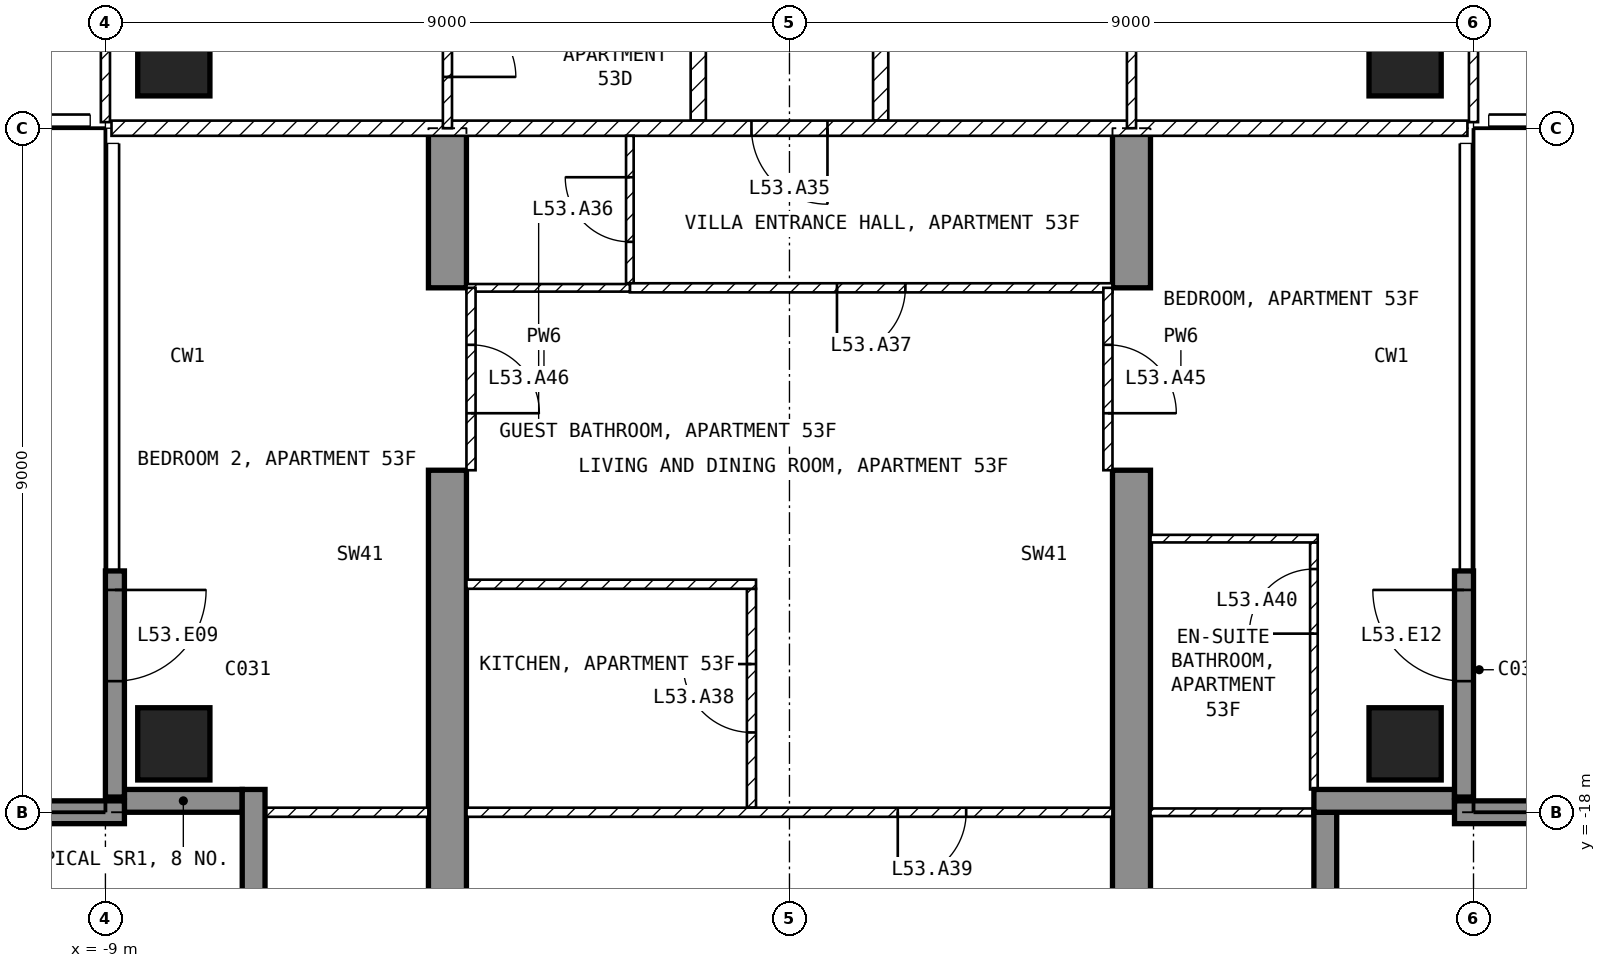
"""IFC4 building model, lengths in metres.
Left out: names, types, materials, properties, quantities, classifications, styles, units other than length and angle.
Written with IfcOpenShell. Run it as: python <this file> out.ifc"""

import sys

from ifc_helpers import new_model, si_unit, direction, frame, frame_2d, origin, origin_2d, place, context, subcontext, project, spatial, polyline, rectangle, outline, extrude, element, fill, save


model = new_model("IFC4")
c1 = context("Model", 3, precision=1e-05, world=origin(), true_north=direction((0.0, 1.0)))
c2 = subcontext(c1, "Body", "Model", "MODEL_VIEW")
j1 = project(units=[si_unit("LENGTHUNIT", "METRE"), si_unit("PLANEANGLEUNIT", "RADIAN")], contexts=[c1])
p1 = place(None, origin())
s1 = spatial("IfcSite", under=j1, at=p1, CompositionType="ELEMENT")
p2 = place(p1, origin())
s2 = spatial("IfcBuilding", under=s1, at=p2, CompositionType="ELEMENT")
p3 = place(p2, frame((0.0, 0.0, 212.1)))
s3 = spatial("IfcBuildingStorey", under=s2, at=p3, CompositionType="ELEMENT", Elevation=212.1)
for number, where, z_axis, x_axis in (
    (1, (-8.1, -17.1, -0.25), (0.0, 0.0, 1.0), (1.0, 0.0, 0.0)),
    (2, (-8.1, -8.1, -0.25), (0.0, 0.0, 1.0), (1.0, 0.0, 0.0)),
    (3, (8.1, -17.1, -0.25), (0.0, 0.0, 1.0), (1.0, 0.0, 0.0)),
    (4, (8.1, -8.1, -0.25), (0.0, 0.0, 1.0), (1.0, 0.0, 0.0)),
):
    element("IfcColumn", number, at=place(p3, frame(where, z_axis=z_axis, x_axis=x_axis)), inside=s3, PredefinedType="COLUMN", context=c2, shape_type="SweptSolid", body=[
        extrude(rectangle(XDim=0.95, YDim=0.95, at=origin_2d()), origin(), (0.0, 0.0, 1.0), 3.5),
    ])
for number, where, z_axis, x_axis in (
    (5, (-4.75, -20.225, -0.25), (1.0, 0.0, 0.0), (0.0, 1.0, 0.0)),
    (6, (4.25, -20.225, -0.25), (1.0, 0.0, 0.0), (0.0, 1.0, 0.0)),
):
    element("IfcWall", number, at=place(p3, frame(where, z_axis=z_axis, x_axis=x_axis)), inside=s3, PredefinedType="SHEAR", context=c2, shape_type="SweptSolid", body=[
        extrude(outline(polyline([(0.0, 0.0), (6.725, 0.0), (6.725, 2.65), (9.125, 2.65), (9.125, 0.0), (11.225, 0.0), (11.225, 3.5), (0.0, 3.5), (0.0, 0.0)])), origin(), (0.0, 0.0, 1.0), 0.5),
    ])
p4 = place(p3, frame((-8.875, -14.825, 0.0), z_axis=(0.0, 0.0, 1.0), x_axis=(0.0, -1.0, 0.0)))
e7 = element("IfcWall", 7, at=p4, inside=s3, PredefinedType="SOLIDWALL", context=c2, shape_type="SweptSolid", body=[
    extrude(rectangle(XDim=2.975, YDim=0.25, at=frame_2d((1.488, 0.0))), origin(), (0.0, 0.0, 1.0), 3.25),
])
p5 = place(p4, frame((0.25, 0.0, 0.0)))
e8 = element("IfcOpeningElement", 8, at=p5, cuts=e7, PredefinedType="OPENING", context=c2, shape_type="SweptSolid", body=[
    extrude(rectangle(XDim=1.2, YDim=2.4, at=frame_2d((0.6, 1.2))), frame((0.0, 0.135, 0.0), z_axis=(0.0, -1.0, 0.0), x_axis=(1.0, 0.0, 0.0)), (0.0, 0.0, 1.0), 0.27),
])
p6 = place(p3, frame((8.875, -17.8, 0.0), z_axis=(0.0, 0.0, 1.0), x_axis=(0.0, 1.0, 0.0)))
e9 = element("IfcWall", 9, at=p6, inside=s3, PredefinedType="SOLIDWALL", context=c2, shape_type="SweptSolid", body=[
    extrude(rectangle(XDim=2.975, YDim=0.25, at=frame_2d((1.488, 0.0))), origin(), (0.0, 0.0, 1.0), 3.25),
])
p7 = place(p6, frame((1.525, 0.0, 0.0)))
e10 = element("IfcOpeningElement", 10, at=p7, cuts=e9, PredefinedType="OPENING", context=c2, shape_type="SweptSolid", body=[
    extrude(rectangle(XDim=1.2, YDim=2.4, at=frame_2d((0.6, 1.2))), frame((0.0, 0.135, 0.0), z_axis=(0.0, -1.0, 0.0), x_axis=(1.0, 0.0, 0.0)), (0.0, 0.0, 1.0), 0.27),
])
p8 = place(p3, frame((7.05, -19.8, 0.0), z_axis=(0.0, 0.0, 1.0), x_axis=(0.0, 1.0, 0.0)))
e11 = element("IfcWall", 11, at=p8, inside=s3, PredefinedType="SOLIDWALL", context=c2, shape_type="SweptSolid", body=[
    extrude(rectangle(XDim=1.8, YDim=0.3, at=frame_2d((0.9, 0.0))), origin(), (0.0, 0.0, 1.0), 3.25),
])
p9 = place(p3, frame((6.9, -17.85, 0.0), z_axis=(0.0, 0.0, 1.0), x_axis=(1.0, 0.0, 0.0)))
e12 = element("IfcWall", 12, at=p9, inside=s3, PredefinedType="SOLIDWALL", context=c2, shape_type="SweptSolid", body=[
    extrude(rectangle(XDim=1.85, YDim=0.3, at=frame_2d((0.925, 0.0))), origin(), (0.0, 0.0, 1.0), 3.25),
])
p10 = place(p3, frame((-8.75, -17.85, 0.0), z_axis=(0.0, 0.0, 1.0), x_axis=(1.0, 0.0, 0.0)))
e13 = element("IfcWall", 13, at=p10, inside=s3, PredefinedType="SOLIDWALL", context=c2, shape_type="SweptSolid", body=[
    extrude(rectangle(XDim=1.55, YDim=0.3, at=frame_2d((0.775, 0.0))), origin(), (0.0, 0.0, 1.0), 3.25),
])
p11 = place(p3, frame((-7.05, -17.7, 0.0), z_axis=(0.0, 0.0, 1.0), x_axis=(0.0, -1.0, 0.0)))
e14 = element("IfcWall", 14, at=p11, inside=s3, PredefinedType="SOLIDWALL", context=c2, shape_type="SweptSolid", body=[
    extrude(rectangle(XDim=1.8, YDim=0.3, at=frame_2d((0.9, 0.0))), origin(), (0.0, 0.0, 1.0), 3.25),
])
for number, where, z_axis, x_axis in (
    (15, (-8.75, -18.0, 0.0), (0.0, 0.0, 1.0), (-1.0, 0.0, 0.0)),
    (16, (8.75, -18.0, 0.0), (0.0, 0.0, 1.0), (1.0, 0.0, 0.0)),
):
    element("IfcWall", number, at=place(p3, frame(where, z_axis=z_axis, x_axis=x_axis)), inside=s3, PredefinedType="SOLIDWALL", context=c2, shape_type="SweptSolid", body=[
        extrude(rectangle(XDim=2.95, YDim=0.3, at=frame_2d((1.475, 0.0))), origin(), (0.0, 0.0, 1.0), 3.25),
    ])
for number, where, z_axis, x_axis in (
    (17, (1.2, -4.6, 0.0), (0.0, 0.0, 1.0), (0.0, -1.0, 0.0)),
    (18, (-1.2, -8.9, 0.0), (0.0, 0.0, 1.0), (0.0, 1.0, 0.0)),
):
    element("IfcWall", number, at=place(p3, frame(where, z_axis=z_axis, x_axis=x_axis)), inside=s3, PredefinedType="PARTITIONING", context=c2, shape_type="SweptSolid", body=[
        extrude(rectangle(XDim=4.3, YDim=0.2, at=frame_2d((2.15, 0.0))), origin(), (0.0, 0.0, 1.0), 3.25),
    ])
p12 = place(p3, frame((8.92, -9.0, 0.0), z_axis=(0.0, 0.0, 1.0), x_axis=(-1.0, 0.0, 0.0)))
e19 = element("IfcWall", 19, at=p12, inside=s3, PredefinedType="PARTITIONING", context=c2, shape_type="SweptSolid", body=[
    extrude(rectangle(XDim=17.84, YDim=0.2, at=frame_2d((8.92, 0.0))), origin(), (0.0, 0.0, 1.0), 3.25),
])
p13 = place(p12, frame((8.42, 0.0, 0.0)))
e20 = element("IfcOpeningElement", 20, at=p13, cuts=e19, PredefinedType="OPENING", context=c2, shape_type="SweptSolid", body=[
    extrude(rectangle(XDim=1.0, YDim=2.1, at=frame_2d((0.5, 1.05))), frame((0.0, 0.11, 0.0), z_axis=(0.0, -1.0, 0.0), x_axis=(1.0, 0.0, 0.0)), (0.0, 0.0, 1.0), 0.22),
])
p14 = place(p3, frame((9.0, -8.92, 0.0), z_axis=(0.0, 0.0, 1.0), x_axis=(0.0, 1.0, 0.0)))
e21 = element("IfcWall", 21, at=p14, inside=s3, PredefinedType="PARTITIONING", context=c2, shape_type="SweptSolid", body=[
    extrude(rectangle(XDim=7.62, YDim=0.12, at=frame_2d((3.81, 0.0))), origin(), (0.0, 0.0, 1.0), 3.25),
])
p15 = place(p14, frame((2.42, 0.0, 0.0)))
e22 = element("IfcOpeningElement", 22, at=p15, cuts=e21, PredefinedType="OPENING", context=c2, shape_type="SweptSolid", body=[
    extrude(rectangle(XDim=0.9, YDim=2.1, at=frame_2d((0.45, 1.05))), frame((0.0, 0.07, 0.0), z_axis=(0.0, -1.0, 0.0), x_axis=(1.0, 0.0, 0.0)), (0.0, 0.0, 1.0), 0.14),
])
p16 = place(p3, frame((4.5, -9.0, 0.0), z_axis=(0.0, 0.0, 1.0), x_axis=(0.0, 1.0, 0.0)))
e23 = element("IfcWall", 23, at=p16, inside=s3, PredefinedType="PARTITIONING", context=c2, shape_type="SweptSolid", body=[
    extrude(rectangle(XDim=4.4, YDim=0.12, at=frame_2d((2.2, 0.0))), origin(), (0.0, 0.0, 1.0), 3.25),
])
p17 = place(p16, frame((1.75, 0.0, 0.0)))
e24 = element("IfcOpeningElement", 24, at=p17, cuts=e23, PredefinedType="OPENING", context=c2, shape_type="SweptSolid", body=[
    extrude(rectangle(XDim=0.9, YDim=2.1, at=frame_2d((0.45, 1.05))), frame((0.0, 0.07, 0.0), z_axis=(0.0, -1.0, 0.0), x_axis=(1.0, 0.0, 0.0)), (0.0, 0.0, 1.0), 0.14),
])
p18 = place(p3, frame((-9.0, -1.3, 0.0), z_axis=(0.0, 0.0, 1.0), x_axis=(0.0, -1.0, 0.0)))
e25 = element("IfcWall", 25, at=p18, inside=s3, PredefinedType="PARTITIONING", context=c2, shape_type="SweptSolid", body=[
    extrude(rectangle(XDim=7.62, YDim=0.12, at=frame_2d((3.81, 0.0))), origin(), (0.0, 0.0, 1.0), 3.25),
])
p19 = place(p18, frame((4.3, 0.0, 0.0)))
e26 = element("IfcOpeningElement", 26, at=p19, cuts=e25, PredefinedType="OPENING", context=c2, shape_type="SweptSolid", body=[
    extrude(rectangle(XDim=0.9, YDim=2.1, at=frame_2d((0.45, 1.05))), frame((0.0, 0.07, 0.0), z_axis=(0.0, -1.0, 0.0), x_axis=(1.0, 0.0, 0.0)), (0.0, 0.0, 1.0), 0.14),
])
p20 = place(p3, frame((-4.5, -6.75, 0.0), z_axis=(0.0, 0.0, 1.0), x_axis=(0.0, -1.0, 0.0)))
e27 = element("IfcWall", 27, at=p20, inside=s3, PredefinedType="PARTITIONING", context=c2, shape_type="SweptSolid", body=[
    extrude(rectangle(XDim=2.25, YDim=0.12, at=frame_2d((1.125, 0.0))), origin(), (0.0, 0.0, 1.0), 3.25),
])
p21 = place(p20, frame((0.675, 0.0, 0.0)))
e28 = element("IfcOpeningElement", 28, at=p21, cuts=e27, PredefinedType="OPENING", context=c2, shape_type="SweptSolid", body=[
    extrude(rectangle(XDim=0.9, YDim=2.1, at=frame_2d((0.45, 1.05))), frame((0.0, 0.07, 0.0), z_axis=(0.0, -1.0, 0.0), x_axis=(1.0, 0.0, 0.0)), (0.0, 0.0, 1.0), 0.14),
])
p22 = place(p3, frame((-2.1, -11.04, 0.0), z_axis=(0.0, 0.0, 1.0), x_axis=(0.0, 1.0, 0.0)))
e29 = element("IfcWall", 29, at=p22, inside=s3, PredefinedType="PARTITIONING", context=c2, shape_type="SweptSolid", body=[
    extrude(rectangle(XDim=1.94, YDim=0.1, at=frame_2d((0.97, 0.0))), origin(), (0.0, 0.0, 1.0), 3.25),
])
p23 = place(p22, frame((0.545, 0.0, 0.0)))
e30 = element("IfcOpeningElement", 30, at=p23, cuts=e29, PredefinedType="OPENING", context=c2, shape_type="SweptSolid", body=[
    extrude(rectangle(XDim=0.85, YDim=2.1, at=frame_2d((0.425, 1.05))), frame((0.0, 0.06, 0.0), z_axis=(0.0, -1.0, 0.0), x_axis=(1.0, 0.0, 0.0)), (0.0, 0.0, 1.0), 0.12),
])
p24 = place(p3, frame((4.25, -11.1, 0.0), z_axis=(0.0, 0.0, 1.0), x_axis=(-1.0, 0.0, 0.0)))
e31 = element("IfcWall", 31, at=p24, inside=s3, PredefinedType="PARTITIONING", context=c2, shape_type="SweptSolid", body=[
    extrude(rectangle(XDim=6.35, YDim=0.12, at=frame_2d((3.175, 0.0))), origin(), (0.0, 0.0, 1.0), 3.25),
])
p25 = place(p24, frame((2.725, 0.0, 0.0)))
e32 = element("IfcOpeningElement", 32, at=p25, cuts=e31, PredefinedType="OPENING", context=c2, shape_type="SweptSolid", body=[
    extrude(rectangle(XDim=0.9, YDim=2.1, at=frame_2d((0.45, 1.05))), frame((0.0, 0.07, 0.0), z_axis=(0.0, -1.0, 0.0), x_axis=(1.0, 0.0, 0.0)), (0.0, 0.0, 1.0), 0.14),
])
p26 = place(p3, frame((-2.1, -11.1, 0.0), z_axis=(0.0, 0.0, 1.0), x_axis=(-1.0, 0.0, 0.0)))
e33 = element("IfcWall", 33, at=p26, inside=s3, PredefinedType="PARTITIONING", context=c2, shape_type="SweptSolid", body=[
    extrude(rectangle(XDim=2.15, YDim=0.1, at=frame_2d((1.075, 0.0))), origin(), (0.0, 0.0, 1.0), 3.25),
])
p27 = place(p3, frame((-0.5, -17.94, 0.0), z_axis=(0.0, 0.0, 1.0), x_axis=(0.0, 1.0, 0.0)))
e34 = element("IfcWall", 34, at=p27, inside=s3, PredefinedType="PARTITIONING", context=c2, shape_type="SweptSolid", body=[
    extrude(rectangle(XDim=2.88, YDim=0.12, at=frame_2d((1.44, 0.0))), origin(), (0.0, 0.0, 1.0), 3.25),
])
p28 = place(p27, frame((0.99, 0.0, 0.0)))
e35 = element("IfcOpeningElement", 35, at=p28, cuts=e34, PredefinedType="OPENING", context=c2, shape_type="SweptSolid", body=[
    extrude(rectangle(XDim=0.9, YDim=2.1, at=frame_2d((0.45, 1.05))), frame((0.0, 0.07, 0.0), z_axis=(0.0, -1.0, 0.0), x_axis=(1.0, 0.0, 0.0)), (0.0, 0.0, 1.0), 0.14),
])
p29 = place(p3, frame((-0.44, -15.0, 0.0), z_axis=(0.0, 0.0, 1.0), x_axis=(-1.0, 0.0, 0.0)))
e36 = element("IfcWall", 36, at=p29, inside=s3, PredefinedType="PARTITIONING", context=c2, shape_type="SweptSolid", body=[
    extrude(rectangle(XDim=3.81, YDim=0.12, at=frame_2d((1.905, 0.0))), origin(), (0.0, 0.0, 1.0), 3.25),
])
p30 = place(p3, frame((4.25, -18.0, 0.0), z_axis=(0.0, 0.0, 1.0), x_axis=(-1.0, 0.0, 0.0)))
e37 = element("IfcWall", 37, at=p30, inside=s3, PredefinedType="PARTITIONING", context=c2, shape_type="SweptSolid", body=[
    extrude(rectangle(XDim=8.5, YDim=0.12, at=frame_2d((4.25, 0.0))), origin(), (0.0, 0.0, 1.0), 3.25),
])
p31 = place(p30, frame((1.925, 0.0, 0.0)))
e38 = element("IfcOpeningElement", 38, at=p31, cuts=e37, PredefinedType="OPENING", context=c2, shape_type="SweptSolid", body=[
    extrude(rectangle(XDim=0.9, YDim=2.1, at=frame_2d((0.45, 1.05))), frame((0.0, 0.07, 0.0), z_axis=(0.0, -1.0, 0.0), x_axis=(1.0, 0.0, 0.0)), (0.0, 0.0, 1.0), 0.14),
])
p32 = place(p3, frame((6.9, -17.7, 0.0), z_axis=(0.0, 0.0, 1.0), x_axis=(0.0, 1.0, 0.0)))
e39 = element("IfcWall", 39, at=p32, inside=s3, PredefinedType="PARTITIONING", context=c2, shape_type="SweptSolid", body=[
    extrude(rectangle(XDim=3.25, YDim=0.1, at=frame_2d((1.625, 0.0))), origin(), (0.0, 0.0, 1.0), 3.25),
])
p33 = place(p32, frame((2.05, 0.0, 0.0)))
e40 = element("IfcOpeningElement", 40, at=p33, cuts=e39, PredefinedType="OPENING", context=c2, shape_type="SweptSolid", body=[
    extrude(rectangle(XDim=0.85, YDim=2.1, at=frame_2d((0.425, 1.05))), frame((0.0, 0.06, 0.0), z_axis=(0.0, -1.0, 0.0), x_axis=(1.0, 0.0, 0.0)), (0.0, 0.0, 1.0), 0.12),
])
p34 = place(p3, frame((6.95, -14.4, 0.0), z_axis=(0.0, 0.0, 1.0), x_axis=(-1.0, 0.0, 0.0)))
e41 = element("IfcWall", 41, at=p34, inside=s3, PredefinedType="PARTITIONING", context=c2, shape_type="SweptSolid", body=[
    extrude(rectangle(XDim=2.2, YDim=0.1, at=frame_2d((1.1, 0.0))), origin(), (0.0, 0.0, 1.0), 3.25),
])
p35 = place(p3, frame((7.12, -18.0, 0.0), z_axis=(0.0, 0.0, 1.0), x_axis=(-1.0, 0.0, 0.0)))
e42 = element("IfcWall", 42, at=p35, inside=s3, PredefinedType="PARTITIONING", context=c2, shape_type="SweptSolid", body=[
    extrude(rectangle(XDim=2.37, YDim=0.1, at=frame_2d((1.185, 0.0))), origin(), (0.0, 0.0, 1.0), 3.25),
])
p36 = place(p3, frame((-4.75, -18.0, 0.0), z_axis=(0.0, 0.0, 1.0), x_axis=(-1.0, 0.0, 0.0)))
e43 = element("IfcWall", 43, at=p36, inside=s3, PredefinedType="PARTITIONING", context=c2, shape_type="SweptSolid", body=[
    extrude(rectangle(XDim=2.37, YDim=0.12, at=frame_2d((1.185, 0.0))), origin(), (0.0, 0.0, 1.0), 3.25),
])
p37 = place(p3, frame((4.19, -11.1, 0.0), z_axis=(0.0, 0.0, 1.0), x_axis=(0.0, -1.0, 0.0)))
e44 = element("IfcWall", 44, at=p37, inside=s3, PredefinedType="PARTITIONING", context=c2, shape_type="SweptSolid", body=[
    extrude(rectangle(XDim=2.4, YDim=0.12, at=frame_2d((1.2, 0.0))), origin(), (0.0, 0.0, 1.0), 2.4),
])
p38 = place(p37, frame((0.75, 0.0, 0.0)))
e45 = element("IfcOpeningElement", 45, at=p38, cuts=e44, PredefinedType="OPENING", context=c2, shape_type="SweptSolid", body=[
    extrude(rectangle(XDim=0.9, YDim=2.1, at=frame_2d((0.45, 1.05))), frame((0.0, 0.07, 0.0), z_axis=(0.0, -1.0, 0.0), x_axis=(1.0, 0.0, 0.0)), (0.0, 0.0, 1.0), 0.14),
])
p39 = place(p3, frame((-4.19, -11.1, 0.0), z_axis=(0.0, 0.0, 1.0), x_axis=(0.0, -1.0, 0.0)))
e46 = element("IfcWall", 46, at=p39, inside=s3, PredefinedType="PARTITIONING", context=c2, shape_type="SweptSolid", body=[
    extrude(rectangle(XDim=2.4, YDim=0.12, at=frame_2d((1.2, 0.0))), origin(), (0.0, 0.0, 1.0), 2.4),
])
p40 = place(p39, frame((0.75, 0.0, 0.0)))
e47 = element("IfcOpeningElement", 47, at=p40, cuts=e46, PredefinedType="OPENING", context=c2, shape_type="SweptSolid", body=[
    extrude(rectangle(XDim=0.9, YDim=2.1, at=frame_2d((0.45, 1.05))), frame((0.0, 0.07, 0.0), z_axis=(0.0, -1.0, 0.0), x_axis=(1.0, 0.0, 0.0)), (0.0, 0.0, 1.0), 0.14),
])
p41 = place(p5, origin())
e48 = element("IfcDoor", 48, at=p41, inside=s3, OperationType="SINGLE_SWING_LEFT", PredefinedType="DOOR", context=c2, shape_type="SweptSolid", body=[
    extrude(rectangle(XDim=1.2, YDim=2.4, at=frame_2d((0.6, 1.2))), frame((0.0, 0.025, 0.0), z_axis=(0.0, -1.0, 0.0), x_axis=(1.0, 0.0, 0.0)), (0.0, 0.0, 1.0), 0.05),
])
fill(e8, e48)
p42 = place(p7, origin())
e49 = element("IfcDoor", 49, at=p42, inside=s3, OperationType="SINGLE_SWING_RIGHT", PredefinedType="DOOR", context=c2, shape_type="SweptSolid", body=[
    extrude(rectangle(XDim=1.2, YDim=2.4, at=frame_2d((0.6, 1.2))), frame((0.0, 0.025, 0.0), z_axis=(0.0, -1.0, 0.0), x_axis=(1.0, 0.0, 0.0)), (0.0, 0.0, 1.0), 0.05),
])
fill(e10, e49)
p43 = place(p21, origin())
e50 = element("IfcDoor", 50, at=p43, inside=s3, OperationType="SINGLE_SWING_RIGHT", PredefinedType="DOOR", context=c2, shape_type="SweptSolid", body=[
    extrude(rectangle(XDim=0.9, YDim=2.1, at=frame_2d((0.45, 1.05))), frame((0.0, 0.025, 0.0), z_axis=(0.0, -1.0, 0.0), x_axis=(1.0, 0.0, 0.0)), (0.0, 0.0, 1.0), 0.05),
])
fill(e28, e50)
p44 = place(p13, origin())
e51 = element("IfcDoor", 51, at=p44, inside=s3, OperationType="SINGLE_SWING_LEFT", PredefinedType="DOOR", context=c2, shape_type="SweptSolid", body=[
    extrude(rectangle(XDim=1.0, YDim=2.1, at=frame_2d((0.5, 1.05))), frame((0.0, 0.025, 0.0), z_axis=(0.0, -1.0, 0.0), x_axis=(1.0, 0.0, 0.0)), (0.0, 0.0, 1.0), 0.05),
])
fill(e20, e51)
p45 = place(p23, origin())
e52 = element("IfcDoor", 52, at=p45, inside=s3, OperationType="SINGLE_SWING_RIGHT", PredefinedType="DOOR", context=c2, shape_type="SweptSolid", body=[
    extrude(rectangle(XDim=0.85, YDim=2.1, at=frame_2d((0.425, 1.05))), frame((0.0, 0.025, 0.0), z_axis=(0.0, -1.0, 0.0), x_axis=(1.0, 0.0, 0.0)), (0.0, 0.0, 1.0), 0.05),
])
fill(e30, e52)
p46 = place(p25, origin())
e53 = element("IfcDoor", 53, at=p46, inside=s3, OperationType="SINGLE_SWING_RIGHT", PredefinedType="DOOR", context=c2, shape_type="SweptSolid", body=[
    extrude(rectangle(XDim=0.9, YDim=2.1, at=frame_2d((0.45, 1.05))), frame((0.0, 0.025, 0.0), z_axis=(0.0, -1.0, 0.0), x_axis=(1.0, 0.0, 0.0)), (0.0, 0.0, 1.0), 0.05),
])
fill(e32, e53)
p47 = place(p28, origin())
e54 = element("IfcDoor", 54, at=p47, inside=s3, OperationType="SINGLE_SWING_RIGHT", PredefinedType="DOOR", context=c2, shape_type="SweptSolid", body=[
    extrude(rectangle(XDim=0.9, YDim=2.1, at=frame_2d((0.45, 1.05))), frame((0.0, 0.025, 0.0), z_axis=(0.0, -1.0, 0.0), x_axis=(1.0, 0.0, 0.0)), (0.0, 0.0, 1.0), 0.05),
])
fill(e35, e54)
p48 = place(p31, origin())
e55 = element("IfcDoor", 55, at=p48, inside=s3, OperationType="SINGLE_SWING_RIGHT", PredefinedType="DOOR", context=c2, shape_type="SweptSolid", body=[
    extrude(rectangle(XDim=0.9, YDim=2.1, at=frame_2d((0.45, 1.05))), frame((0.0, 0.025, 0.0), z_axis=(0.0, -1.0, 0.0), x_axis=(1.0, 0.0, 0.0)), (0.0, 0.0, 1.0), 0.05),
])
fill(e38, e55)
p49 = place(p33, origin())
e56 = element("IfcDoor", 56, at=p49, inside=s3, OperationType="SINGLE_SWING_LEFT", PredefinedType="DOOR", context=c2, shape_type="SweptSolid", body=[
    extrude(rectangle(XDim=0.85, YDim=2.1, at=frame_2d((0.425, 1.05))), frame((0.0, 0.025, 0.0), z_axis=(0.0, -1.0, 0.0), x_axis=(1.0, 0.0, 0.0)), (0.0, 0.0, 1.0), 0.05),
])
fill(e40, e56)
p50 = place(p38, origin())
e57 = element("IfcDoor", 57, at=p50, inside=s3, OperationType="SINGLE_SWING_RIGHT", PredefinedType="DOOR", context=c2, shape_type="SweptSolid", body=[
    extrude(rectangle(XDim=0.9, YDim=2.1, at=frame_2d((0.45, 1.05))), frame((0.0, 0.025, 0.0), z_axis=(0.0, -1.0, 0.0), x_axis=(1.0, 0.0, 0.0)), (0.0, 0.0, 1.0), 0.05),
])
fill(e45, e57)
p51 = place(p40, origin())
e58 = element("IfcDoor", 58, at=p51, inside=s3, OperationType="SINGLE_SWING_RIGHT", PredefinedType="DOOR", context=c2, shape_type="SweptSolid", body=[
    extrude(rectangle(XDim=0.9, YDim=2.1, at=frame_2d((0.45, 1.05))), frame((0.0, 0.025, 0.0), z_axis=(0.0, -1.0, 0.0), x_axis=(1.0, 0.0, 0.0)), (0.0, 0.0, 1.0), 0.05),
])
fill(e47, e58)
save(model, sys.argv[1])
